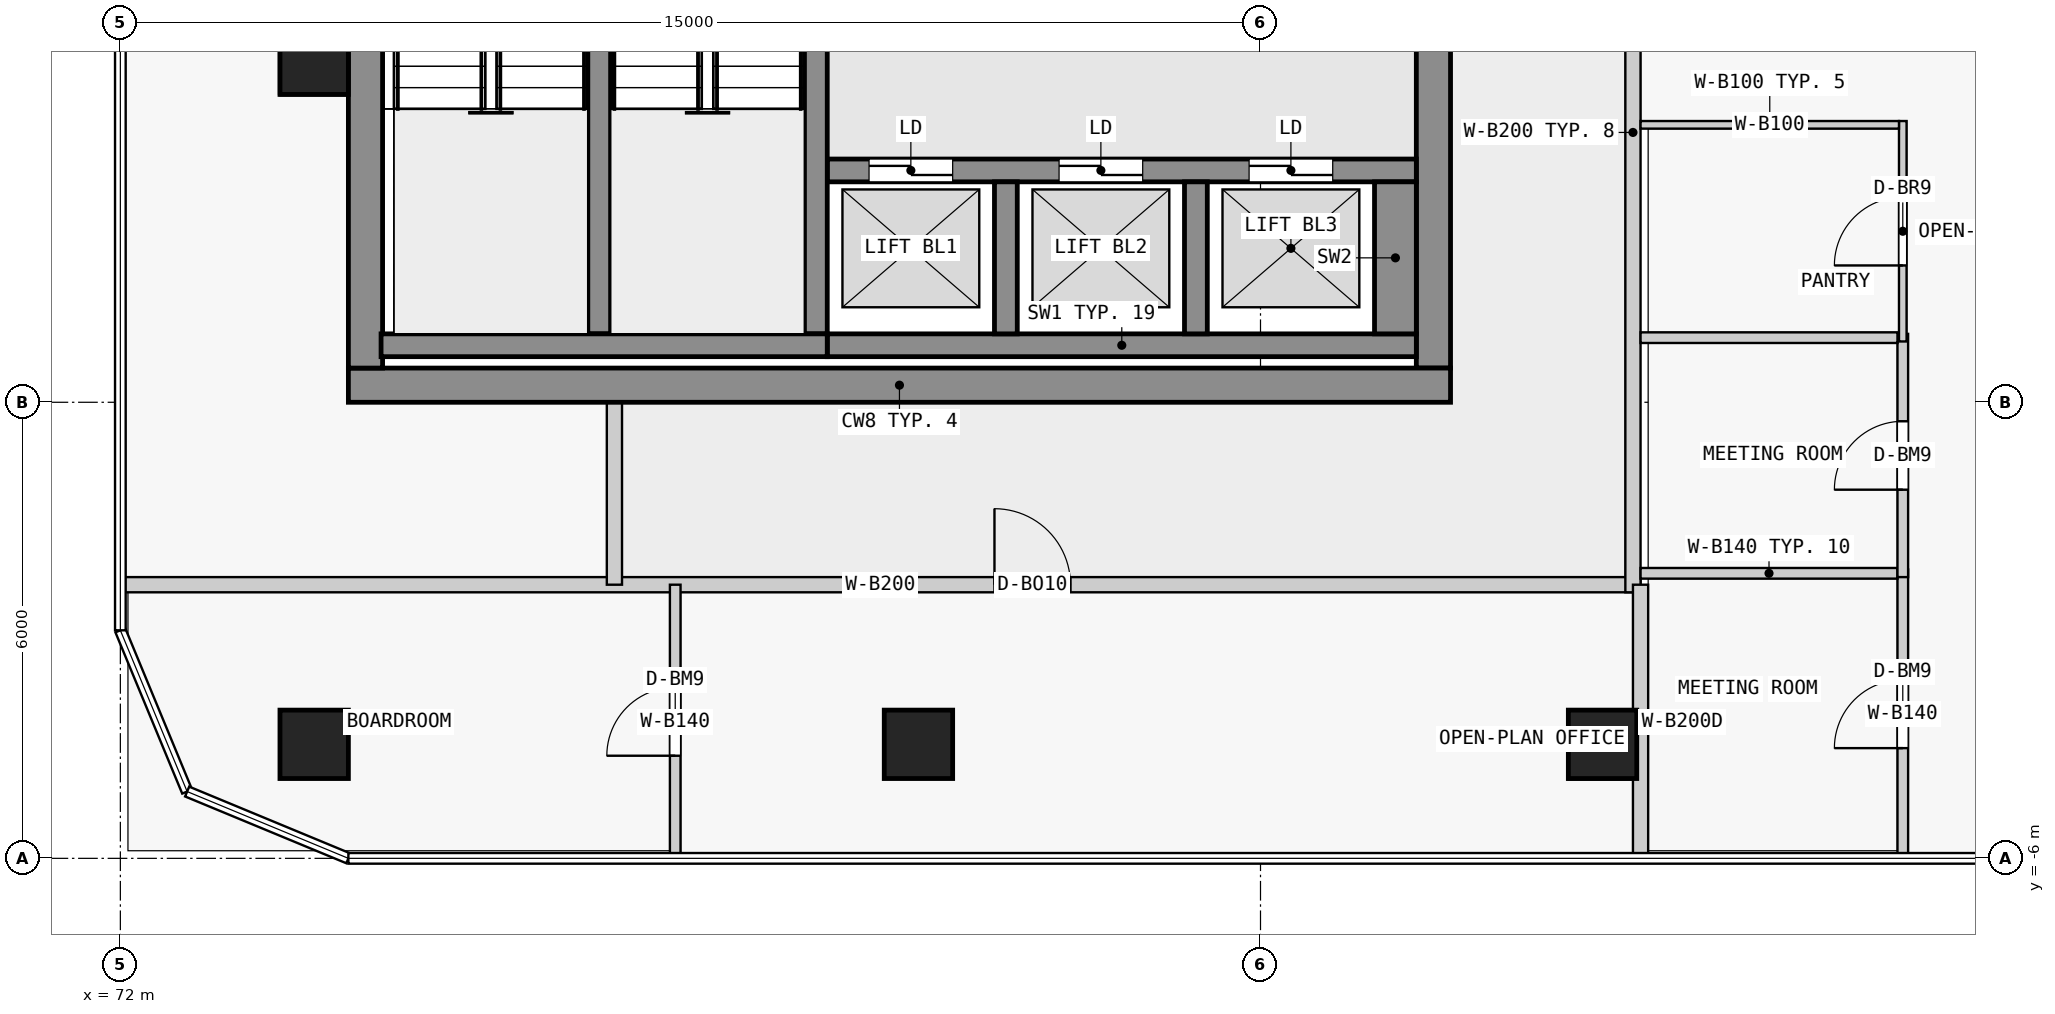
"""IFC4 building model, lengths in metres.
Left out: names, types, materials, properties, quantities, classifications, styles, units other than length and angle.
Written with IfcOpenShell. Run it as: python <this file> out.ifc"""

import sys

from ifc_helpers import new_model, si_unit, direction, frame, frame_2d, origin, origin_2d, place, context, subcontext, project, spatial, rectangle, extrude, element, fill, save


model = new_model("IFC4")
c1 = context("Model", 3, precision=1e-05, world=origin(), true_north=direction((0.0, 1.0)))
c2 = subcontext(c1, "Body", "Model", "MODEL_VIEW")
j1 = project(units=[si_unit("LENGTHUNIT", "METRE"), si_unit("PLANEANGLEUNIT", "RADIAN")], contexts=[c1])
p1 = place(None, origin())
s1 = spatial("IfcSite", under=j1, at=p1, CompositionType="ELEMENT")
p2 = place(p1, origin())
s2 = spatial("IfcBuilding", under=s1, at=p2, CompositionType="ELEMENT")
p3 = place(p2, frame((0.0, 0.0, 72.3)))
s3 = spatial("IfcBuildingStorey", under=s2, at=p3, CompositionType="ELEMENT", Elevation=72.3)
for number, where, z_axis, x_axis in (
    (1, (74.55, -4.5, 0.0), (0.0, 0.0, 1.0), (1.0, 0.0, 0.0)),
    (2, (82.5, -4.5, 0.0), (0.0, 0.0, 1.0), (1.0, 0.0, 0.0)),
    (3, (91.5, -4.5, 0.0), (0.0, 0.0, 1.0), (1.0, 0.0, 0.0)),
    (4, (74.55, 4.5, 0.0), (0.0, 0.0, 1.0), (1.0, 0.0, 0.0)),
):
    element("IfcColumn", number, at=place(p3, frame(where, z_axis=z_axis, x_axis=x_axis)), inside=s3, PredefinedType="COLUMN", context=c2, shape_type="SweptSolid", body=[
        extrude(rectangle(XDim=0.9, YDim=0.9, at=origin_2d()), origin(), (0.0, 0.0, 1.0), 6.0),
    ])
p4 = place(p3, frame((75.0, 0.225, 0.0), z_axis=(0.0, 0.0, 1.0), x_axis=(1.0, 0.0, 0.0)))
e5 = element("IfcWall", 5, at=p4, inside=s3, PredefinedType="SHEAR", context=c2, shape_type="SweptSolid", body=[
    extrude(rectangle(XDim=14.5, YDim=0.45, at=frame_2d((7.25, 0.0))), origin(), (0.0, 0.0, 1.0), 5.75),
])
p5 = place(p3, frame((75.225, 0.45, 0.0), z_axis=(0.0, 0.0, 1.0), x_axis=(0.0, 1.0, 0.0)))
e6 = element("IfcWall", 6, at=p5, inside=s3, PredefinedType="SHEAR", context=c2, shape_type="SweptSolid", body=[
    extrude(rectangle(XDim=17.1, YDim=0.45, at=frame_2d((8.55, 0.0))), origin(), (0.0, 0.0, 1.0), 5.75),
])
p6 = place(p5, frame((7.875, 0.0, 0.0)))
e7 = element("IfcOpeningElement", 7, at=p6, cuts=e6, PredefinedType="OPENING", context=c2, shape_type="SweptSolid", body=[
    extrude(rectangle(XDim=1.8, YDim=2.1, at=frame_2d((0.9, 1.05))), frame((0.0, 0.235, 0.0), z_axis=(0.0, -1.0, 0.0), x_axis=(1.0, 0.0, 0.0)), (0.0, 0.0, 1.0), 0.47),
])
p7 = place(p3, frame((89.275, 0.45, 0.0), z_axis=(0.0, 0.0, 1.0), x_axis=(0.0, 1.0, 0.0)))
e8 = element("IfcWall", 8, at=p7, inside=s3, PredefinedType="SHEAR", context=c2, shape_type="SweptSolid", body=[
    extrude(rectangle(XDim=17.1, YDim=0.45, at=frame_2d((8.55, 0.0))), origin(), (0.0, 0.0, 1.0), 5.75),
])
p8 = place(p7, frame((7.65, 0.0, 0.0)))
e9 = element("IfcOpeningElement", 9, at=p8, cuts=e8, PredefinedType="OPENING", context=c2, shape_type="SweptSolid", body=[
    extrude(rectangle(XDim=1.8, YDim=2.1, at=frame_2d((0.9, 1.05))), frame((0.0, 0.235, 0.0), z_axis=(0.0, -1.0, 0.0), x_axis=(1.0, 0.0, 0.0)), (0.0, 0.0, 1.0), 0.47),
])
p9 = place(p7, frame((15.65, 0.0, 0.0)))
e10 = element("IfcOpeningElement", 10, at=p9, cuts=e8, PredefinedType="OPENING", context=c2, shape_type="SweptSolid", body=[
    extrude(rectangle(XDim=0.9, YDim=2.1, at=frame_2d((0.45, 1.05))), frame((0.0, 0.235, 0.0), z_axis=(0.0, -1.0, 0.0), x_axis=(1.0, 0.0, 0.0)), (0.0, 0.0, 1.0), 0.47),
])
p10 = place(p3, frame((75.43, 0.75, 0.0), z_axis=(0.0, 0.0, 1.0), x_axis=(1.0, 0.0, 0.0)))
e11 = element("IfcWall", 11, at=p10, inside=s3, PredefinedType="SHEAR", context=c2, shape_type="SweptSolid", body=[
    extrude(rectangle(XDim=5.87, YDim=0.3, at=frame_2d((2.935, 0.0))), origin(), (0.0, 0.0, 1.0), 5.75),
])
for number, where, z_axis, x_axis in (
    (12, (78.3, 0.9, 0.0), (0.0, 0.0, 1.0), (0.0, 1.0, 0.0)),
    (13, (81.15, 0.9, 0.0), (0.0, 0.0, 1.0), (0.0, 1.0, 0.0)),
):
    element("IfcWall", number, at=place(p3, frame(where, z_axis=z_axis, x_axis=x_axis)), inside=s3, PredefinedType="SHEAR", context=c2, shape_type="SweptSolid", body=[
        extrude(rectangle(XDim=6.4, YDim=0.3, at=frame_2d((3.2, 0.0))), origin(), (0.0, 0.0, 1.0), 5.75),
    ])
p11 = place(p3, frame((81.3, 0.75, 0.0), z_axis=(0.0, 0.0, 1.0), x_axis=(1.0, 0.0, 0.0)))
e14 = element("IfcWall", 14, at=p11, inside=s3, PredefinedType="SHEAR", context=c2, shape_type="SweptSolid", body=[
    extrude(rectangle(XDim=7.75, YDim=0.3, at=frame_2d((3.875, 0.0))), origin(), (0.0, 0.0, 1.0), 5.75),
])
for number, where, z_axis, x_axis in (
    (15, (83.65, 0.9, 0.0), (0.0, 0.0, 1.0), (0.0, 1.0, 0.0)),
    (16, (86.15, 0.9, 0.0), (0.0, 0.0, 1.0), (0.0, 1.0, 0.0)),
):
    element("IfcWall", number, at=place(p3, frame(where, z_axis=z_axis, x_axis=x_axis)), inside=s3, PredefinedType="SHEAR", context=c2, shape_type="SweptSolid", body=[
        extrude(rectangle(XDim=2.0, YDim=0.3, at=frame_2d((1.0, 0.0))), origin(), (0.0, 0.0, 1.0), 5.75),
    ])
p12 = place(p3, frame((88.775, 0.9, 0.0), z_axis=(0.0, 0.0, 1.0), x_axis=(0.0, 1.0, 0.0)))
e17 = element("IfcWall", 17, at=p12, inside=s3, PredefinedType="SHEAR", context=c2, shape_type="SweptSolid", body=[
    extrude(rectangle(XDim=2.0, YDim=0.55, at=frame_2d((1.0, 0.0))), origin(), (0.0, 0.0, 1.0), 5.75),
])
p13 = place(p3, frame((81.3, 3.05, 0.0), z_axis=(0.0, 0.0, 1.0), x_axis=(1.0, 0.0, 0.0)))
e18 = element("IfcWall", 18, at=p13, inside=s3, PredefinedType="SHEAR", context=c2, shape_type="SweptSolid", body=[
    extrude(rectangle(XDim=7.75, YDim=0.3, at=frame_2d((3.875, 0.0))), origin(), (0.0, 0.0, 1.0), 5.75),
])
p14 = place(p13, frame((0.55, 0.0, 0.0)))
e19 = element("IfcOpeningElement", 19, at=p14, cuts=e18, PredefinedType="OPENING", context=c2, shape_type="SweptSolid", body=[
    extrude(rectangle(XDim=1.1, YDim=2.1, at=frame_2d((0.55, 1.05))), frame((0.0, 0.16, 0.0), z_axis=(0.0, -1.0, 0.0), x_axis=(1.0, 0.0, 0.0)), (0.0, 0.0, 1.0), 0.32),
])
p15 = place(p13, frame((3.05, 0.0, 0.0)))
e20 = element("IfcOpeningElement", 20, at=p15, cuts=e18, PredefinedType="OPENING", context=c2, shape_type="SweptSolid", body=[
    extrude(rectangle(XDim=1.1, YDim=2.1, at=frame_2d((0.55, 1.05))), frame((0.0, 0.16, 0.0), z_axis=(0.0, -1.0, 0.0), x_axis=(1.0, 0.0, 0.0)), (0.0, 0.0, 1.0), 0.32),
])
p16 = place(p13, frame((5.55, 0.0, 0.0)))
e21 = element("IfcOpeningElement", 21, at=p16, cuts=e18, PredefinedType="OPENING", context=c2, shape_type="SweptSolid", body=[
    extrude(rectangle(XDim=1.1, YDim=2.1, at=frame_2d((0.55, 1.05))), frame((0.0, 0.16, 0.0), z_axis=(0.0, -1.0, 0.0), x_axis=(1.0, 0.0, 0.0)), (0.0, 0.0, 1.0), 0.32),
])
p17 = place(p3, frame((72.0, -2.4, 0.0), z_axis=(0.0, 0.0, 1.0), x_axis=(1.0, 0.0, 0.0)))
e22 = element("IfcWall", 22, at=p17, inside=s3, PredefinedType="PARTITIONING", context=c2, shape_type="SweptSolid", body=[
    extrude(rectangle(XDim=20.0, YDim=0.2, at=frame_2d((10.0, 0.0))), origin(), (0.0, 0.0, 1.0), 5.75),
])
p18 = place(p17, frame((11.5, 0.0, 0.0)))
e23 = element("IfcOpeningElement", 23, at=p18, cuts=e22, PredefinedType="OPENING", context=c2, shape_type="SweptSolid", body=[
    extrude(rectangle(XDim=1.0, YDim=2.4, at=frame_2d((0.5, 1.2))), frame((0.0, 0.11, 0.0), z_axis=(0.0, -1.0, 0.0), x_axis=(1.0, 0.0, 0.0)), (0.0, 0.0, 1.0), 0.22),
])
p19 = place(p3, frame((91.9, -2.5, 0.0), z_axis=(0.0, 0.0, 1.0), x_axis=(0.0, 1.0, 0.0)))
e24 = element("IfcWall", 24, at=p19, inside=s3, PredefinedType="PARTITIONING", context=c2, shape_type="SweptSolid", body=[
    extrude(rectangle(XDim=12.1, YDim=0.2, at=frame_2d((6.05, 0.0))), origin(), (0.0, 0.0, 1.0), 5.75),
])
p20 = place(p19, frame((8.3, 0.0, 0.0)))
e25 = element("IfcOpeningElement", 25, at=p20, cuts=e24, PredefinedType="OPENING", context=c2, shape_type="SweptSolid", body=[
    extrude(rectangle(XDim=1.4, YDim=2.4, at=frame_2d((0.7, 1.2))), frame((0.0, 0.11, 0.0), z_axis=(0.0, -1.0, 0.0), x_axis=(1.0, 0.0, 0.0)), (0.0, 0.0, 1.0), 0.22),
])
p21 = place(p3, frame((92.0, -6.0, 0.0), z_axis=(0.0, 0.0, 1.0), x_axis=(0.0, 1.0, 0.0)))
e26 = element("IfcWall", 26, at=p21, inside=s3, PredefinedType="PARTITIONING", context=c2, shape_type="SweptSolid", body=[
    extrude(rectangle(XDim=3.6, YDim=0.2, at=frame_2d((1.8, 0.0))), origin(), (0.0, 0.0, 1.0), 5.75),
])
p22 = place(p3, frame((78.5, -2.4, 0.0), z_axis=(0.0, 0.0, 1.0), x_axis=(0.0, 1.0, 0.0)))
e27 = element("IfcWall", 27, at=p22, inside=s3, PredefinedType="PARTITIONING", context=c2, shape_type="SweptSolid", body=[
    extrude(rectangle(XDim=2.4, YDim=0.2, at=frame_2d((1.2, 0.0))), origin(), (0.0, 0.0, 1.0), 5.75),
])
p23 = place(p3, frame((79.3, -6.0, 0.0), z_axis=(0.0, 0.0, 1.0), x_axis=(0.0, 1.0, 0.0)))
e28 = element("IfcWall", 28, at=p23, inside=s3, PredefinedType="PARTITIONING", context=c2, shape_type="SweptSolid", body=[
    extrude(rectangle(XDim=3.6, YDim=0.14, at=frame_2d((1.8, 0.0))), origin(), (0.0, 0.0, 1.0), 5.75),
])
p24 = place(p23, frame((1.35, 0.0, 0.0)))
e29 = element("IfcOpeningElement", 29, at=p24, cuts=e28, PredefinedType="OPENING", context=c2, shape_type="SweptSolid", body=[
    extrude(rectangle(XDim=0.9, YDim=2.4, at=frame_2d((0.45, 1.2))), frame((0.0, 0.08, 0.0), z_axis=(0.0, -1.0, 0.0), x_axis=(1.0, 0.0, 0.0)), (0.0, 0.0, 1.0), 0.16),
])
p25 = place(p3, frame((95.45, -6.0, 0.0), z_axis=(0.0, 0.0, 1.0), x_axis=(0.0, 1.0, 0.0)))
e30 = element("IfcWall", 30, at=p25, inside=s3, PredefinedType="PARTITIONING", context=c2, shape_type="SweptSolid", body=[
    extrude(rectangle(XDim=3.8, YDim=0.14, at=frame_2d((1.9, 0.0))), origin(), (0.0, 0.0, 1.0), 5.75),
])
p26 = place(p25, frame((1.45, 0.0, 0.0)))
e31 = element("IfcOpeningElement", 31, at=p26, cuts=e30, PredefinedType="OPENING", context=c2, shape_type="SweptSolid", body=[
    extrude(rectangle(XDim=0.9, YDim=2.4, at=frame_2d((0.45, 1.2))), frame((0.0, 0.08, 0.0), z_axis=(0.0, -1.0, 0.0), x_axis=(1.0, 0.0, 0.0)), (0.0, 0.0, 1.0), 0.16),
])
p27 = place(p3, frame((92.0, -2.25, 0.0), z_axis=(0.0, 0.0, 1.0), x_axis=(1.0, 0.0, 0.0)))
e32 = element("IfcWall", 32, at=p27, inside=s3, PredefinedType="PARTITIONING", context=c2, shape_type="SweptSolid", body=[
    extrude(rectangle(XDim=3.38, YDim=0.14, at=frame_2d((1.69, 0.0))), origin(), (0.0, 0.0, 1.0), 5.75),
])
p28 = place(p3, frame((95.45, -2.3, 0.0), z_axis=(0.0, 0.0, 1.0), x_axis=(0.0, 1.0, 0.0)))
e33 = element("IfcWall", 33, at=p28, inside=s3, PredefinedType="PARTITIONING", context=c2, shape_type="SweptSolid", body=[
    extrude(rectangle(XDim=3.2, YDim=0.14, at=frame_2d((1.6, 0.0))), origin(), (0.0, 0.0, 1.0), 5.75),
])
p29 = place(p28, frame((1.15, 0.0, 0.0)))
e34 = element("IfcOpeningElement", 34, at=p29, cuts=e33, PredefinedType="OPENING", context=c2, shape_type="SweptSolid", body=[
    extrude(rectangle(XDim=0.9, YDim=2.4, at=frame_2d((0.45, 1.2))), frame((0.0, 0.08, 0.0), z_axis=(0.0, -1.0, 0.0), x_axis=(1.0, 0.0, 0.0)), (0.0, 0.0, 1.0), 0.16),
])
p30 = place(p3, frame((92.0, 0.85, 0.0), z_axis=(0.0, 0.0, 1.0), x_axis=(1.0, 0.0, 0.0)))
e35 = element("IfcWall", 35, at=p30, inside=s3, PredefinedType="PARTITIONING", context=c2, shape_type="SweptSolid", body=[
    extrude(rectangle(XDim=3.38, YDim=0.14, at=frame_2d((1.69, 0.0))), origin(), (0.0, 0.0, 1.0), 5.75),
])
p31 = place(p3, frame((95.45, 0.8, 0.0), z_axis=(0.0, 0.0, 1.0), x_axis=(0.0, 1.0, 0.0)))
e36 = element("IfcWall", 36, at=p31, inside=s3, PredefinedType="PARTITIONING", context=c2, shape_type="SweptSolid", body=[
    extrude(rectangle(XDim=2.9, YDim=0.1, at=frame_2d((1.45, 0.0))), origin(), (0.0, 0.0, 1.0), 5.75),
])
p32 = place(p31, frame((1.0, 0.0, 0.0)))
e37 = element("IfcOpeningElement", 37, at=p32, cuts=e36, PredefinedType="OPENING", context=c2, shape_type="SweptSolid", body=[
    extrude(rectangle(XDim=0.9, YDim=2.1, at=frame_2d((0.45, 1.05))), frame((0.0, 0.06, 0.0), z_axis=(0.0, -1.0, 0.0), x_axis=(1.0, 0.0, 0.0)), (0.0, 0.0, 1.0), 0.12),
])
p33 = place(p3, frame((92.0, 3.65, 0.0), z_axis=(0.0, 0.0, 1.0), x_axis=(1.0, 0.0, 0.0)))
e38 = element("IfcWall", 38, at=p33, inside=s3, PredefinedType="PARTITIONING", context=c2, shape_type="SweptSolid", body=[
    extrude(rectangle(XDim=3.4, YDim=0.1, at=frame_2d((1.7, 0.0))), origin(), (0.0, 0.0, 1.0), 5.75),
])
p34 = place(p14, origin())
e39 = element("IfcDoor", 39, at=p34, inside=s3, OperationType="DOUBLE_DOOR_SLIDING", PredefinedType="DOOR", context=c2, shape_type="SweptSolid", body=[
    extrude(rectangle(XDim=1.1, YDim=2.1, at=frame_2d((0.55, 1.05))), frame((0.0, 0.025, 0.0), z_axis=(0.0, -1.0, 0.0), x_axis=(1.0, 0.0, 0.0)), (0.0, 0.0, 1.0), 0.05),
])
fill(e19, e39)
p35 = place(p15, origin())
e40 = element("IfcDoor", 40, at=p35, inside=s3, OperationType="DOUBLE_DOOR_SLIDING", PredefinedType="DOOR", context=c2, shape_type="SweptSolid", body=[
    extrude(rectangle(XDim=1.1, YDim=2.1, at=frame_2d((0.55, 1.05))), frame((0.0, 0.025, 0.0), z_axis=(0.0, -1.0, 0.0), x_axis=(1.0, 0.0, 0.0)), (0.0, 0.0, 1.0), 0.05),
])
fill(e20, e40)
p36 = place(p16, origin())
e41 = element("IfcDoor", 41, at=p36, inside=s3, OperationType="DOUBLE_DOOR_SLIDING", PredefinedType="DOOR", context=c2, shape_type="SweptSolid", body=[
    extrude(rectangle(XDim=1.1, YDim=2.1, at=frame_2d((0.55, 1.05))), frame((0.0, 0.025, 0.0), z_axis=(0.0, -1.0, 0.0), x_axis=(1.0, 0.0, 0.0)), (0.0, 0.0, 1.0), 0.05),
])
fill(e21, e41)
p37 = place(p18, origin())
e42 = element("IfcDoor", 42, at=p37, inside=s3, OperationType="SINGLE_SWING_LEFT", PredefinedType="DOOR", context=c2, shape_type="SweptSolid", body=[
    extrude(rectangle(XDim=1.0, YDim=2.4, at=frame_2d((0.5, 1.2))), frame((0.0, 0.025, 0.0), z_axis=(0.0, -1.0, 0.0), x_axis=(1.0, 0.0, 0.0)), (0.0, 0.0, 1.0), 0.05),
])
fill(e23, e42)
p38 = place(p24, origin())
e43 = element("IfcDoor", 43, at=p38, inside=s3, OperationType="SINGLE_SWING_LEFT", PredefinedType="DOOR", context=c2, shape_type="SweptSolid", body=[
    extrude(rectangle(XDim=0.9, YDim=2.4, at=frame_2d((0.45, 1.2))), frame((0.0, 0.025, 0.0), z_axis=(0.0, -1.0, 0.0), x_axis=(1.0, 0.0, 0.0)), (0.0, 0.0, 1.0), 0.05),
])
fill(e29, e43)
p39 = place(p26, origin())
e44 = element("IfcDoor", 44, at=p39, inside=s3, OperationType="SINGLE_SWING_LEFT", PredefinedType="DOOR", context=c2, shape_type="SweptSolid", body=[
    extrude(rectangle(XDim=0.9, YDim=2.4, at=frame_2d((0.45, 1.2))), frame((0.0, 0.025, 0.0), z_axis=(0.0, -1.0, 0.0), x_axis=(1.0, 0.0, 0.0)), (0.0, 0.0, 1.0), 0.05),
])
fill(e31, e44)
p40 = place(p29, origin())
e45 = element("IfcDoor", 45, at=p40, inside=s3, OperationType="SINGLE_SWING_LEFT", PredefinedType="DOOR", context=c2, shape_type="SweptSolid", body=[
    extrude(rectangle(XDim=0.9, YDim=2.4, at=frame_2d((0.45, 1.2))), frame((0.0, 0.025, 0.0), z_axis=(0.0, -1.0, 0.0), x_axis=(1.0, 0.0, 0.0)), (0.0, 0.0, 1.0), 0.05),
])
fill(e34, e45)
p41 = place(p32, origin())
e46 = element("IfcDoor", 46, at=p41, inside=s3, OperationType="SINGLE_SWING_LEFT", PredefinedType="DOOR", context=c2, shape_type="SweptSolid", body=[
    extrude(rectangle(XDim=0.9, YDim=2.1, at=frame_2d((0.45, 1.05))), frame((0.0, 0.025, 0.0), z_axis=(0.0, -1.0, 0.0), x_axis=(1.0, 0.0, 0.0)), (0.0, 0.0, 1.0), 0.05),
])
fill(e37, e46)
save(model, sys.argv[1])
